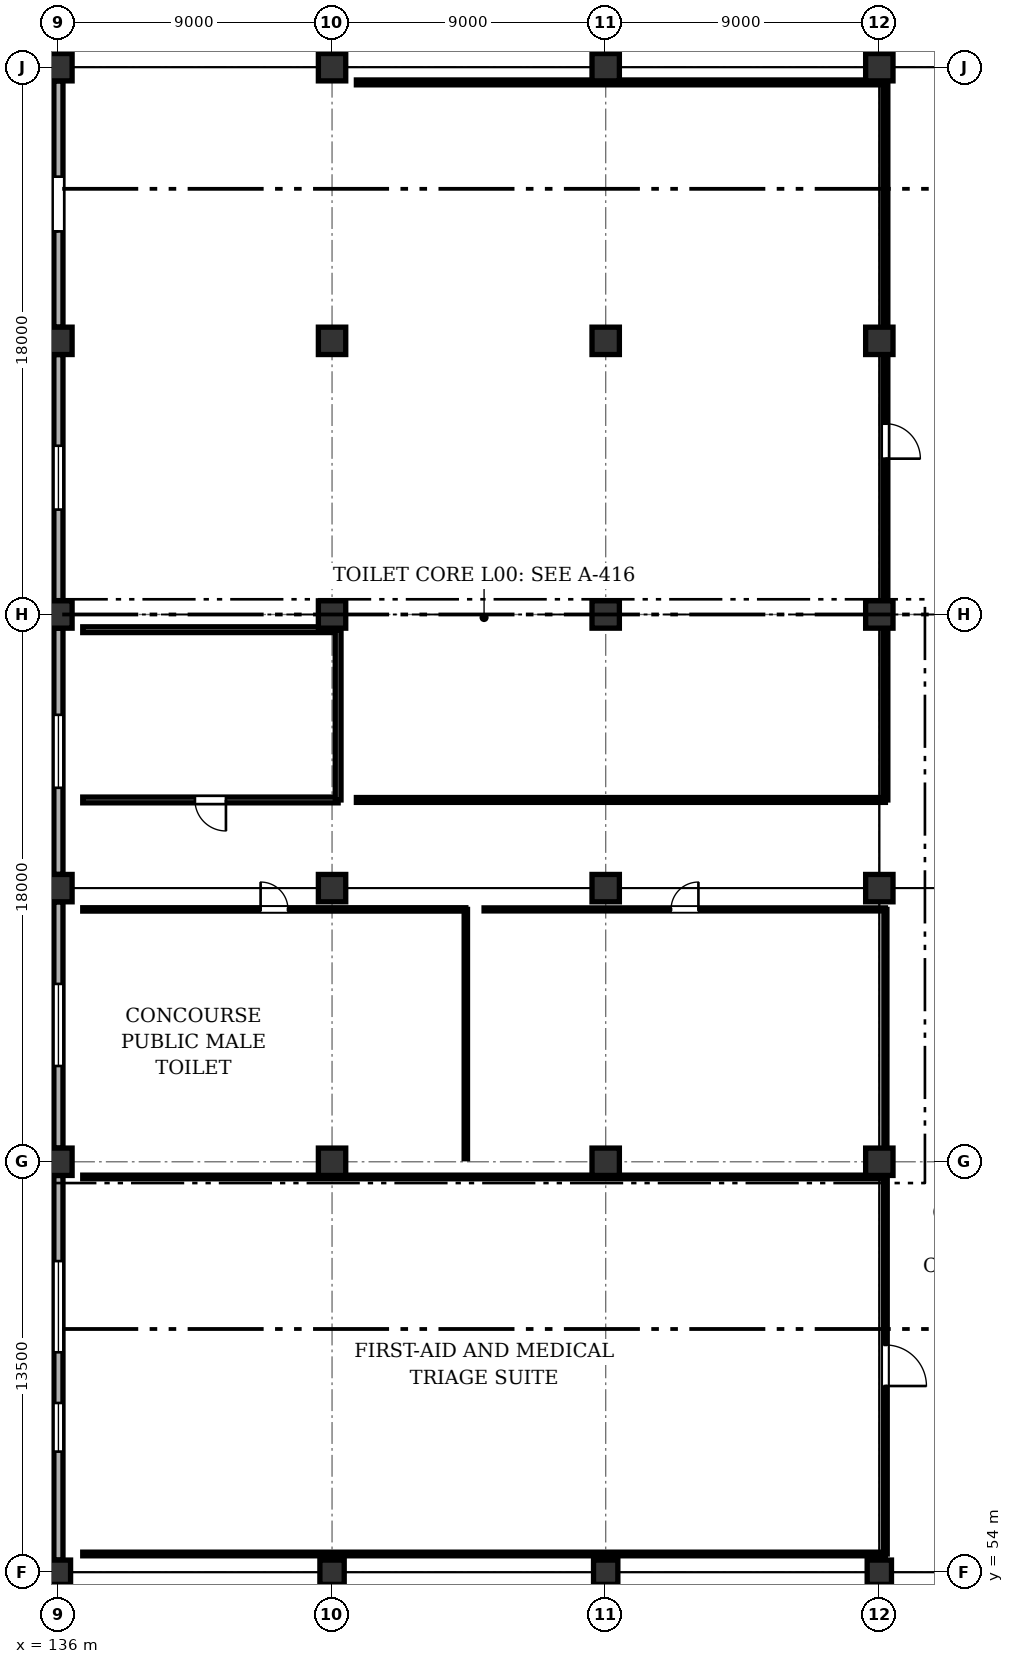
"""IFC4 building model, lengths in metres.
Left out: names, types, materials, properties, quantities, classifications, styles, units other than length and angle.
Written with IfcOpenShell. Run it as: python <this file> out.ifc"""

import sys

from ifc_helpers import new_model, si_unit, direction, frame, frame_2d, origin, origin_2d, place, context, subcontext, project, spatial, rectangle, extrude, element, fill, save


model = new_model("IFC4")
c1 = context("Model", 3, precision=1e-05, world=origin(), true_north=direction((0.0, 1.0)))
c2 = subcontext(c1, "Body", "Model", "MODEL_VIEW")
j1 = project(units=[si_unit("LENGTHUNIT", "METRE"), si_unit("PLANEANGLEUNIT", "RADIAN")], contexts=[c1])
p1 = place(None, origin())
s1 = spatial("IfcSite", under=j1, at=p1, CompositionType="ELEMENT")
p2 = place(p1, origin())
s2 = spatial("IfcBuilding", under=s1, at=p2, CompositionType="ELEMENT")
p3 = place(p2, origin())
s3 = spatial("IfcBuildingStorey", under=s2, at=p3, CompositionType="ELEMENT", Elevation=0.0)
p4 = place(p3, frame((136.0, 54.0, 0.0), z_axis=(0.0, 0.0, 1.0), x_axis=(1.0, 0.0, 0.0)))
e1 = element("IfcColumn", 1, at=p4, inside=s3, PredefinedType="COLUMN", context=c2, shape_type="SweptSolid", body=[
    extrude(rectangle(XDim=0.8, YDim=0.8, at=origin_2d()), origin(), (0.0, 0.0, 1.0), 6.6),
])
for number, where, z_axis, x_axis in (
    (2, (136.0, 67.5, 0.0), (0.0, 0.0, 1.0), (1.0, 0.0, 0.0)),
    (3, (136.0, 76.5, 0.0), (0.0, 0.0, 1.0), (1.0, 0.0, 0.0)),
    (4, (136.0, 85.5, 0.0), (0.0, 0.0, 1.0), (1.0, 0.0, 0.0)),
    (5, (136.0, 94.5, 0.0), (0.0, 0.0, 1.0), (1.0, 0.0, 0.0)),
    (6, (136.0, 103.5, 0.0), (0.0, 0.0, 1.0), (1.0, 0.0, 0.0)),
):
    element("IfcColumn", number, at=place(p3, frame(where, z_axis=z_axis, x_axis=x_axis)), inside=s3, PredefinedType="COLUMN", context=c2, shape_type="SweptSolid", body=[
        extrude(rectangle(XDim=0.9, YDim=0.9, at=origin_2d()), origin(), (0.0, 0.0, 1.0), 6.6),
    ])
p5 = place(p3, frame((145.0, 54.0, 0.0), z_axis=(0.0, 0.0, 1.0), x_axis=(1.0, 0.0, 0.0)))
e7 = element("IfcColumn", 7, at=p5, inside=s3, PredefinedType="COLUMN", context=c2, shape_type="SweptSolid", body=[
    extrude(rectangle(XDim=0.8, YDim=0.8, at=origin_2d()), origin(), (0.0, 0.0, 1.0), 6.6),
])
for number, where, z_axis, x_axis in (
    (8, (145.0, 67.5, 0.0), (0.0, 0.0, 1.0), (1.0, 0.0, 0.0)),
    (9, (145.0, 76.5, 0.0), (0.0, 0.0, 1.0), (1.0, 0.0, 0.0)),
    (10, (145.0, 85.5, 0.0), (0.0, 0.0, 1.0), (1.0, 0.0, 0.0)),
    (11, (145.0, 94.5, 0.0), (0.0, 0.0, 1.0), (1.0, 0.0, 0.0)),
    (12, (145.0, 103.5, 0.0), (0.0, 0.0, 1.0), (1.0, 0.0, 0.0)),
):
    element("IfcColumn", number, at=place(p3, frame(where, z_axis=z_axis, x_axis=x_axis)), inside=s3, PredefinedType="COLUMN", context=c2, shape_type="SweptSolid", body=[
        extrude(rectangle(XDim=0.9, YDim=0.9, at=origin_2d()), origin(), (0.0, 0.0, 1.0), 6.6),
    ])
p6 = place(p3, frame((154.0, 54.0, 0.0), z_axis=(0.0, 0.0, 1.0), x_axis=(1.0, 0.0, 0.0)))
e13 = element("IfcColumn", 13, at=p6, inside=s3, PredefinedType="COLUMN", context=c2, shape_type="SweptSolid", body=[
    extrude(rectangle(XDim=0.8, YDim=0.8, at=origin_2d()), origin(), (0.0, 0.0, 1.0), 6.6),
])
for number, where, z_axis, x_axis in (
    (14, (154.0, 67.5, 0.0), (0.0, 0.0, 1.0), (1.0, 0.0, 0.0)),
    (15, (154.0, 76.5, 0.0), (0.0, 0.0, 1.0), (1.0, 0.0, 0.0)),
    (16, (154.0, 85.5, 0.0), (0.0, 0.0, 1.0), (1.0, 0.0, 0.0)),
    (17, (154.0, 94.5, 0.0), (0.0, 0.0, 1.0), (1.0, 0.0, 0.0)),
    (18, (154.0, 103.5, 0.0), (0.0, 0.0, 1.0), (1.0, 0.0, 0.0)),
):
    element("IfcColumn", number, at=place(p3, frame(where, z_axis=z_axis, x_axis=x_axis)), inside=s3, PredefinedType="COLUMN", context=c2, shape_type="SweptSolid", body=[
        extrude(rectangle(XDim=0.9, YDim=0.9, at=origin_2d()), origin(), (0.0, 0.0, 1.0), 6.6),
    ])
p7 = place(p3, frame((163.0, 54.0, 0.0), z_axis=(0.0, 0.0, 1.0), x_axis=(1.0, 0.0, 0.0)))
e19 = element("IfcColumn", 19, at=p7, inside=s3, PredefinedType="COLUMN", context=c2, shape_type="SweptSolid", body=[
    extrude(rectangle(XDim=0.8, YDim=0.8, at=origin_2d()), origin(), (0.0, 0.0, 1.0), 6.6),
])
for number, where, z_axis, x_axis in (
    (20, (163.0, 67.5, 0.0), (0.0, 0.0, 1.0), (1.0, 0.0, 0.0)),
    (21, (163.0, 76.5, 0.0), (0.0, 0.0, 1.0), (1.0, 0.0, 0.0)),
    (22, (163.0, 85.5, 0.0), (0.0, 0.0, 1.0), (1.0, 0.0, 0.0)),
    (23, (163.0, 94.5, 0.0), (0.0, 0.0, 1.0), (1.0, 0.0, 0.0)),
    (24, (163.0, 103.5, 0.0), (0.0, 0.0, 1.0), (1.0, 0.0, 0.0)),
):
    element("IfcColumn", number, at=place(p3, frame(where, z_axis=z_axis, x_axis=x_axis)), inside=s3, PredefinedType="COLUMN", context=c2, shape_type="SweptSolid", body=[
        extrude(rectangle(XDim=0.9, YDim=0.9, at=origin_2d()), origin(), (0.0, 0.0, 1.0), 6.6),
    ])
p8 = place(p3, frame((136.0, 54.4, 0.0), z_axis=(0.0, 0.0, 1.0), x_axis=(0.0, 1.0, 0.0)))
e25 = element("IfcWall", 25, at=p8, inside=s3, PredefinedType="SOLIDWALL", context=c2, shape_type="SweptSolid", body=[
    extrude(rectangle(XDim=12.65, YDim=0.3, at=frame_2d((6.325, 0.0))), origin(), (0.0, 0.0, 1.0), 5.77),
])
p9 = place(p8, frame((3.567, 0.0, 0.95)))
e26 = element("IfcOpeningElement", 26, at=p9, cuts=e25, PredefinedType="OPENING", context=c2, shape_type="SweptSolid", body=[
    extrude(rectangle(XDim=1.6, YDim=1.9, at=frame_2d((0.8, 0.95))), frame((0.0, 0.16, 0.0), z_axis=(0.0, -1.0, 0.0), x_axis=(1.0, 0.0, 0.0)), (0.0, 0.0, 1.0), 0.32),
])
p10 = place(p8, frame((6.833, 0.0, 0.95)))
e27 = element("IfcOpeningElement", 27, at=p10, cuts=e25, PredefinedType="OPENING", context=c2, shape_type="SweptSolid", body=[
    extrude(rectangle(XDim=3.0, YDim=2.1, at=frame_2d((1.5, 1.05))), frame((0.0, 0.16, 0.0), z_axis=(0.0, -1.0, 0.0), x_axis=(1.0, 0.0, 0.0)), (0.0, 0.0, 1.0), 0.32),
])
p11 = place(p3, frame((136.0, 67.95, 0.0), z_axis=(0.0, 0.0, 1.0), x_axis=(0.0, 1.0, 0.0)))
e28 = element("IfcWall", 28, at=p11, inside=s3, PredefinedType="SOLIDWALL", context=c2, shape_type="SweptSolid", body=[
    extrude(rectangle(XDim=8.1, YDim=0.3, at=frame_2d((4.05, 0.0))), origin(), (0.0, 0.0, 1.0), 5.77),
])
p12 = place(p11, frame((2.7, 0.0, 0.95)))
e29 = element("IfcOpeningElement", 29, at=p12, cuts=e28, PredefinedType="OPENING", context=c2, shape_type="SweptSolid", body=[
    extrude(rectangle(XDim=2.7, YDim=2.1, at=frame_2d((1.35, 1.05))), frame((0.0, 0.16, 0.0), z_axis=(0.0, -1.0, 0.0), x_axis=(1.0, 0.0, 0.0)), (0.0, 0.0, 1.0), 0.32),
])
p13 = place(p3, frame((136.0, 76.95, 0.0), z_axis=(0.0, 0.0, 1.0), x_axis=(0.0, 1.0, 0.0)))
e30 = element("IfcWall", 30, at=p13, inside=s3, PredefinedType="SOLIDWALL", context=c2, shape_type="SweptSolid", body=[
    extrude(rectangle(XDim=8.1, YDim=0.3, at=frame_2d((4.05, 0.0))), origin(), (0.0, 0.0, 1.0), 5.93),
])
p14 = place(p13, frame((2.85, 0.0, 0.95)))
e31 = element("IfcOpeningElement", 31, at=p14, cuts=e30, PredefinedType="OPENING", context=c2, shape_type="SweptSolid", body=[
    extrude(rectangle(XDim=2.4, YDim=2.1, at=frame_2d((1.2, 1.05))), frame((0.0, 0.16, 0.0), z_axis=(0.0, -1.0, 0.0), x_axis=(1.0, 0.0, 0.0)), (0.0, 0.0, 1.0), 0.32),
])
p15 = place(p3, frame((136.0, 85.95, 0.0), z_axis=(0.0, 0.0, 1.0), x_axis=(0.0, 1.0, 0.0)))
e32 = element("IfcWall", 32, at=p15, inside=s3, PredefinedType="SOLIDWALL", context=c2, shape_type="SweptSolid", body=[
    extrude(rectangle(XDim=8.1, YDim=0.3, at=frame_2d((4.05, 0.0))), origin(), (0.0, 0.0, 1.0), 5.93),
])
p16 = place(p15, frame((3.0, 0.0, 0.95)))
e33 = element("IfcOpeningElement", 33, at=p16, cuts=e32, PredefinedType="OPENING", context=c2, shape_type="SweptSolid", body=[
    extrude(rectangle(XDim=2.1, YDim=2.0, at=frame_2d((1.05, 1.0))), frame((0.0, 0.16, 0.0), z_axis=(0.0, -1.0, 0.0), x_axis=(1.0, 0.0, 0.0)), (0.0, 0.0, 1.0), 0.32),
])
p17 = place(p3, frame((136.0, 94.95, 0.0), z_axis=(0.0, 0.0, 1.0), x_axis=(0.0, 1.0, 0.0)))
e34 = element("IfcWall", 34, at=p17, inside=s3, PredefinedType="SOLIDWALL", context=c2, shape_type="SweptSolid", body=[
    extrude(rectangle(XDim=8.1, YDim=0.3, at=frame_2d((4.05, 0.0))), origin(), (0.0, 0.0, 1.0), 5.715),
])
p18 = place(p17, frame((3.15, 0.0, 0.0)))
e35 = element("IfcOpeningElement", 35, at=p18, cuts=e34, PredefinedType="OPENING", context=c2, shape_type="SweptSolid", body=[
    extrude(rectangle(XDim=1.8, YDim=2.35, at=frame_2d((0.9, 1.175))), frame((0.0, 0.16, 0.0), z_axis=(0.0, -1.0, 0.0), x_axis=(1.0, 0.0, 0.0)), (0.0, 0.0, 1.0), 0.32),
])
for number, where, z_axis, x_axis in (
    (36, (163.2, 54.6, 0.0), (0.0, 0.0, 1.0), (-1.0, 0.0, 0.0)),
    (37, (136.8, 67.0, 0.0), (0.0, 0.0, 1.0), (1.0, 0.0, 0.0)),
):
    element("IfcWall", number, at=place(p3, frame(where, z_axis=z_axis, x_axis=x_axis)), inside=s3, PredefinedType="PARTITIONING", context=c2, shape_type="SweptSolid", body=[
        extrude(rectangle(XDim=26.4, YDim=0.12, at=frame_2d((13.2, 0.0))), origin(), (0.0, 0.0, 1.0), 4.4),
    ])
p19 = place(p3, frame((163.2, 67.0, 0.0), z_axis=(0.0, 0.0, 1.0), x_axis=(0.0, -1.0, 0.0)))
e38 = element("IfcWall", 38, at=p19, inside=s3, PredefinedType="PARTITIONING", context=c2, shape_type="SweptSolid", body=[
    extrude(rectangle(XDim=12.4, YDim=0.12, at=frame_2d((6.2, 0.0))), origin(), (0.0, 0.0, 1.0), 4.4),
])
p20 = place(p19, frame((5.525, 0.0, 0.0)))
e39 = element("IfcOpeningElement", 39, at=p20, cuts=e38, PredefinedType="OPENING", context=c2, shape_type="SweptSolid", body=[
    extrude(rectangle(XDim=1.35, YDim=2.1, at=frame_2d((0.675, 1.05))), frame((0.0, 0.07, 0.0), z_axis=(0.0, -1.0, 0.0), x_axis=(1.0, 0.0, 0.0)), (0.0, 0.0, 1.0), 0.14),
])
p21 = place(p3, frame((136.8, 75.8, 0.0), z_axis=(0.0, 0.0, 1.0), x_axis=(1.0, 0.0, 0.0)))
e40 = element("IfcWall", 40, at=p21, inside=s3, PredefinedType="PARTITIONING", context=c2, shape_type="SweptSolid", body=[
    extrude(rectangle(XDim=12.6, YDim=0.11, at=frame_2d((6.3, 0.0))), origin(), (0.0, 0.0, 1.0), 4.4),
])
p22 = place(p21, frame((5.85, 0.0, 0.0)))
e41 = element("IfcOpeningElement", 41, at=p22, cuts=e40, PredefinedType="OPENING", context=c2, shape_type="SweptSolid", body=[
    extrude(rectangle(XDim=0.9, YDim=2.1, at=frame_2d((0.45, 1.05))), frame((0.0, 0.065, 0.0), z_axis=(0.0, -1.0, 0.0), x_axis=(1.0, 0.0, 0.0)), (0.0, 0.0, 1.0), 0.13),
])
p23 = place(p3, frame((149.4, 75.8, 0.0), z_axis=(0.0, 0.0, 1.0), x_axis=(0.0, -1.0, 0.0)))
e42 = element("IfcWall", 42, at=p23, inside=s3, PredefinedType="PARTITIONING", context=c2, shape_type="SweptSolid", body=[
    extrude(rectangle(XDim=8.2, YDim=0.11, at=frame_2d((4.1, 0.0))), origin(), (0.0, 0.0, 1.0), 4.4),
])
p24 = place(p3, frame((150.0, 75.8, 0.0), z_axis=(0.0, 0.0, 1.0), x_axis=(1.0, 0.0, 0.0)))
e43 = element("IfcWall", 43, at=p24, inside=s3, PredefinedType="PARTITIONING", context=c2, shape_type="SweptSolid", body=[
    extrude(rectangle(XDim=13.2, YDim=0.1, at=frame_2d((6.6, 0.0))), origin(), (0.0, 0.0, 1.0), 4.4),
])
p25 = place(p24, frame((6.15, 0.0, 0.0)))
e44 = element("IfcOpeningElement", 44, at=p25, cuts=e43, PredefinedType="OPENING", context=c2, shape_type="SweptSolid", body=[
    extrude(rectangle(XDim=0.9, YDim=2.1, at=frame_2d((0.45, 1.05))), frame((0.0, 0.06, 0.0), z_axis=(0.0, -1.0, 0.0), x_axis=(1.0, 0.0, 0.0)), (0.0, 0.0, 1.0), 0.12),
])
p26 = place(p3, frame((163.2, 75.8, 0.0), z_axis=(0.0, 0.0, 1.0), x_axis=(0.0, -1.0, 0.0)))
e45 = element("IfcWall", 45, at=p26, inside=s3, PredefinedType="PARTITIONING", context=c2, shape_type="SweptSolid", body=[
    extrude(rectangle(XDim=8.2, YDim=0.1, at=frame_2d((4.1, 0.0))), origin(), (0.0, 0.0, 1.0), 4.4),
])
p27 = place(p3, frame((145.2, 79.4, 0.0), z_axis=(0.0, 0.0, 1.0), x_axis=(-1.0, 0.0, 0.0)))
e46 = element("IfcWall", 46, at=p27, inside=s3, PredefinedType="PARTITIONING", context=c2, shape_type="SweptSolid", body=[
    extrude(rectangle(XDim=8.4, YDim=0.19, at=frame_2d((4.2, 0.0))), origin(), (0.0, 0.0, 1.0), 4.4),
])
p28 = place(p27, frame((3.69, 0.0, 0.0)))
e47 = element("IfcOpeningElement", 47, at=p28, cuts=e46, PredefinedType="OPENING", context=c2, shape_type="SweptSolid", body=[
    extrude(rectangle(XDim=1.02, YDim=2.05, at=frame_2d((0.51, 1.025))), frame((0.0, 0.105, 0.0), z_axis=(0.0, -1.0, 0.0), x_axis=(1.0, 0.0, 0.0)), (0.0, 0.0, 1.0), 0.21),
])
p29 = place(p3, frame((136.8, 85.0, 0.0), z_axis=(0.0, 0.0, 1.0), x_axis=(1.0, 0.0, 0.0)))
e48 = element("IfcWall", 48, at=p29, inside=s3, PredefinedType="PARTITIONING", context=c2, shape_type="SweptSolid", body=[
    extrude(rectangle(XDim=8.4, YDim=0.19, at=frame_2d((4.2, 0.0))), origin(), (0.0, 0.0, 1.0), 4.4),
])
p30 = place(p3, frame((145.2, 85.0, 0.0), z_axis=(0.0, 0.0, 1.0), x_axis=(0.0, -1.0, 0.0)))
e49 = element("IfcWall", 49, at=p30, inside=s3, PredefinedType="PARTITIONING", context=c2, shape_type="SweptSolid", body=[
    extrude(rectangle(XDim=5.6, YDim=0.19, at=frame_2d((2.8, 0.0))), origin(), (0.0, 0.0, 1.0), 4.4),
])
for number, where, z_axis, x_axis in (
    (50, (163.2, 79.4, 0.0), (0.0, 0.0, 1.0), (-1.0, 0.0, 0.0)),
    (51, (145.8, 103.0, 0.0), (0.0, 0.0, 1.0), (1.0, 0.0, 0.0)),
):
    element("IfcWall", number, at=place(p3, frame(where, z_axis=z_axis, x_axis=x_axis)), inside=s3, PredefinedType="PARTITIONING", context=c2, shape_type="SweptSolid", body=[
        extrude(rectangle(XDim=17.4, YDim=0.16, at=frame_2d((8.7, 0.0))), origin(), (0.0, 0.0, 1.0), 4.4),
    ])
p31 = place(p3, frame((163.2, 103.0, 0.0), z_axis=(0.0, 0.0, 1.0), x_axis=(0.0, -1.0, 0.0)))
e52 = element("IfcWall", 52, at=p31, inside=s3, PredefinedType="PARTITIONING", context=c2, shape_type="SweptSolid", body=[
    extrude(rectangle(XDim=23.6, YDim=0.16, at=frame_2d((11.8, 0.0))), origin(), (0.0, 0.0, 1.0), 4.4),
])
p32 = place(p31, frame((11.225, 0.0, 0.0)))
e53 = element("IfcOpeningElement", 53, at=p32, cuts=e52, PredefinedType="OPENING", context=c2, shape_type="SweptSolid", body=[
    extrude(rectangle(XDim=1.15, YDim=2.1, at=frame_2d((0.575, 1.05))), frame((0.0, 0.09, 0.0), z_axis=(0.0, -1.0, 0.0), x_axis=(1.0, 0.0, 0.0)), (0.0, 0.0, 1.0), 0.18),
])
p33 = place(p9, origin())
e54 = element("IfcWindow", 54, at=p33, inside=s3, PartitioningType="SINGLE_PANEL", PredefinedType="WINDOW", context=c2, shape_type="SweptSolid", body=[
    extrude(rectangle(XDim=1.6, YDim=1.9, at=frame_2d((0.8, 0.95))), frame((0.0, 0.03, 0.0), z_axis=(0.0, -1.0, 0.0), x_axis=(1.0, 0.0, 0.0)), (0.0, 0.0, 1.0), 0.06),
])
fill(e26, e54)
p34 = place(p10, origin())
e55 = element("IfcWindow", 55, at=p34, inside=s3, PartitioningType="SINGLE_PANEL", PredefinedType="WINDOW", context=c2, shape_type="SweptSolid", body=[
    extrude(rectangle(XDim=3.0, YDim=2.1, at=frame_2d((1.5, 1.05))), frame((0.0, 0.03, 0.0), z_axis=(0.0, -1.0, 0.0), x_axis=(1.0, 0.0, 0.0)), (0.0, 0.0, 1.0), 0.06),
])
fill(e27, e55)
p35 = place(p12, origin())
e56 = element("IfcWindow", 56, at=p35, inside=s3, PartitioningType="SINGLE_PANEL", PredefinedType="WINDOW", context=c2, shape_type="SweptSolid", body=[
    extrude(rectangle(XDim=2.7, YDim=2.1, at=frame_2d((1.35, 1.05))), frame((0.0, 0.03, 0.0), z_axis=(0.0, -1.0, 0.0), x_axis=(1.0, 0.0, 0.0)), (0.0, 0.0, 1.0), 0.06),
])
fill(e29, e56)
p36 = place(p14, origin())
e57 = element("IfcWindow", 57, at=p36, inside=s3, PartitioningType="SINGLE_PANEL", PredefinedType="WINDOW", context=c2, shape_type="SweptSolid", body=[
    extrude(rectangle(XDim=2.4, YDim=2.1, at=frame_2d((1.2, 1.05))), frame((0.0, 0.03, 0.0), z_axis=(0.0, -1.0, 0.0), x_axis=(1.0, 0.0, 0.0)), (0.0, 0.0, 1.0), 0.06),
])
fill(e31, e57)
p37 = place(p16, origin())
e58 = element("IfcWindow", 58, at=p37, inside=s3, PartitioningType="SINGLE_PANEL", PredefinedType="WINDOW", context=c2, shape_type="SweptSolid", body=[
    extrude(rectangle(XDim=2.1, YDim=2.0, at=frame_2d((1.05, 1.0))), frame((0.0, 0.03, 0.0), z_axis=(0.0, -1.0, 0.0), x_axis=(1.0, 0.0, 0.0)), (0.0, 0.0, 1.0), 0.06),
])
fill(e33, e58)
p38 = place(p18, origin())
e59 = element("IfcDoor", 59, at=p38, inside=s3, OperationType="SINGLE_SWING_LEFT", PredefinedType="DOOR", context=c2, shape_type="SweptSolid", body=[
    extrude(rectangle(XDim=1.8, YDim=2.35, at=frame_2d((0.9, 1.175))), frame((0.0, 0.025, 0.0), z_axis=(0.0, -1.0, 0.0), x_axis=(1.0, 0.0, 0.0)), (0.0, 0.0, 1.0), 0.05),
])
fill(e35, e59)
p39 = place(p20, origin())
e60 = element("IfcDoor", 60, at=p39, inside=s3, OperationType="SINGLE_SWING_RIGHT", PredefinedType="DOOR", context=c2, shape_type="SweptSolid", body=[
    extrude(rectangle(XDim=1.35, YDim=2.1, at=frame_2d((0.675, 1.05))), frame((0.0, 0.025, 0.0), z_axis=(0.0, -1.0, 0.0), x_axis=(1.0, 0.0, 0.0)), (0.0, 0.0, 1.0), 0.05),
])
fill(e39, e60)
p40 = place(p22, origin())
e61 = element("IfcDoor", 61, at=p40, inside=s3, OperationType="SINGLE_SWING_LEFT", PredefinedType="DOOR", context=c2, shape_type="SweptSolid", body=[
    extrude(rectangle(XDim=0.9, YDim=2.1, at=frame_2d((0.45, 1.05))), frame((0.0, 0.025, 0.0), z_axis=(0.0, -1.0, 0.0), x_axis=(1.0, 0.0, 0.0)), (0.0, 0.0, 1.0), 0.05),
])
fill(e41, e61)
p41 = place(p25, origin())
e62 = element("IfcDoor", 62, at=p41, inside=s3, OperationType="SINGLE_SWING_RIGHT", PredefinedType="DOOR", context=c2, shape_type="SweptSolid", body=[
    extrude(rectangle(XDim=0.9, YDim=2.1, at=frame_2d((0.45, 1.05))), frame((0.0, 0.025, 0.0), z_axis=(0.0, -1.0, 0.0), x_axis=(1.0, 0.0, 0.0)), (0.0, 0.0, 1.0), 0.05),
])
fill(e44, e62)
p42 = place(p28, origin())
e63 = element("IfcDoor", 63, at=p42, inside=s3, OperationType="SINGLE_SWING_LEFT", PredefinedType="DOOR", context=c2, shape_type="SweptSolid", body=[
    extrude(rectangle(XDim=1.02, YDim=2.05, at=frame_2d((0.51, 1.025))), frame((0.0, 0.025, 0.0), z_axis=(0.0, -1.0, 0.0), x_axis=(1.0, 0.0, 0.0)), (0.0, 0.0, 1.0), 0.05),
])
fill(e47, e63)
p43 = place(p32, origin())
e64 = element("IfcDoor", 64, at=p43, inside=s3, OperationType="SINGLE_SWING_RIGHT", PredefinedType="DOOR", context=c2, shape_type="SweptSolid", body=[
    extrude(rectangle(XDim=1.15, YDim=2.1, at=frame_2d((0.575, 1.05))), frame((0.0, 0.025, 0.0), z_axis=(0.0, -1.0, 0.0), x_axis=(1.0, 0.0, 0.0)), (0.0, 0.0, 1.0), 0.05),
])
fill(e53, e64)
save(model, sys.argv[1])
